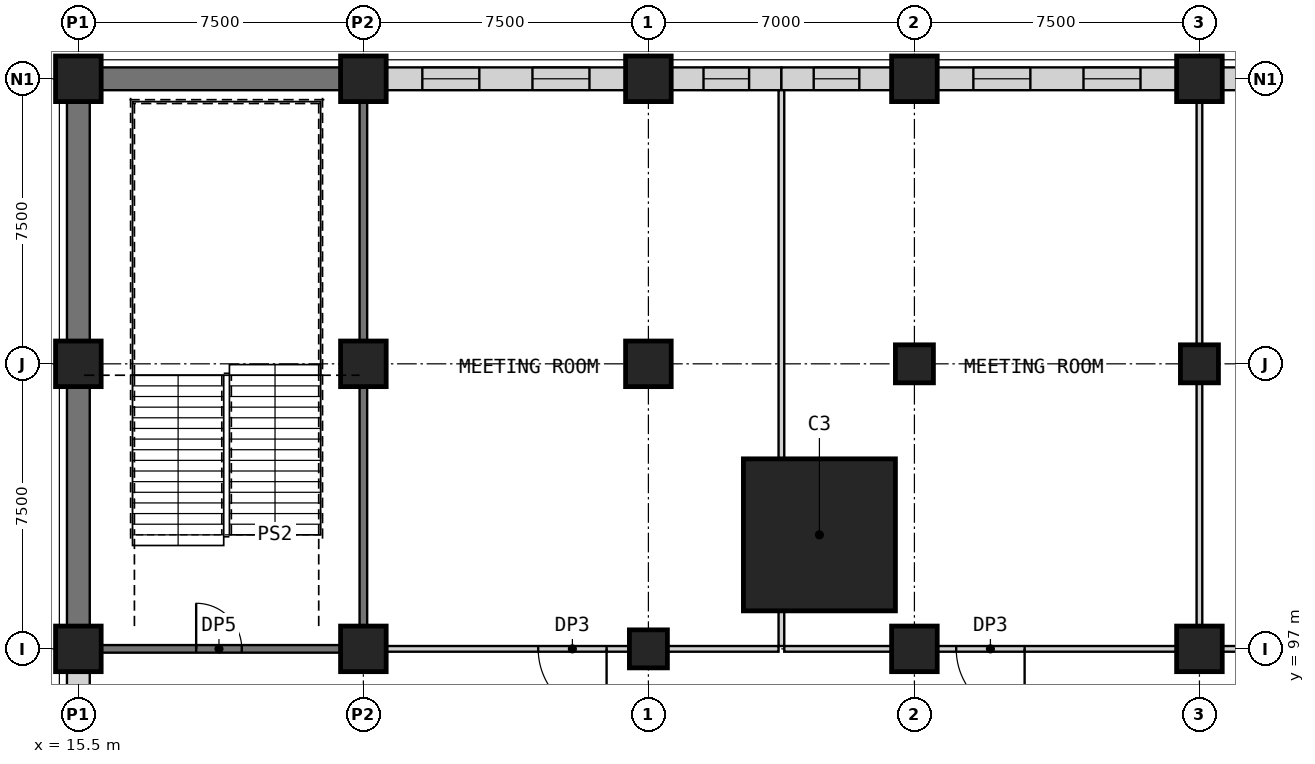
"""IFC4 building model, lengths in metres.
Left out: names, types, materials, properties, quantities, classifications, styles, units other than length and angle.
Written with IfcOpenShell. Run it as: python <this file> out.ifc"""

import sys

from ifc_helpers import new_model, si_unit, direction, frame, frame_2d, origin, origin_2d, place, context, subcontext, project, spatial, rectangle, extrude, element, fill, save


model = new_model("IFC4")
c1 = context("Model", 3, precision=1e-05, world=origin(), true_north=direction((0.0, 1.0)))
c2 = subcontext(c1, "Body", "Model", "MODEL_VIEW")
j1 = project(units=[si_unit("LENGTHUNIT", "METRE"), si_unit("PLANEANGLEUNIT", "RADIAN")], contexts=[c1])
p1 = place(None, origin())
s1 = spatial("IfcSite", under=j1, at=p1, CompositionType="ELEMENT")
p2 = place(p1, origin())
s2 = spatial("IfcBuilding", under=s1, at=p2, CompositionType="ELEMENT")
p3 = place(p2, frame((0.0, 0.0, 23.5)))
s3 = spatial("IfcBuildingStorey", under=s2, at=p3, CompositionType="ELEMENT", Elevation=23.5)
p4 = place(p3, frame((30.5, 97.0, 0.0), z_axis=(0.0, 0.0, 1.0), x_axis=(1.0, 0.0, 0.0)))
e1 = element("IfcColumn", 1, at=p4, inside=s3, PredefinedType="COLUMN", context=c2, shape_type="SweptSolid", body=[
    extrude(rectangle(XDim=1.0, YDim=1.0, at=origin_2d()), origin(), (0.0, 0.0, 1.0), 5.5),
])
p5 = place(p3, frame((37.5, 97.0, 0.0), z_axis=(0.0, 0.0, 1.0), x_axis=(1.0, 0.0, 0.0)))
e2 = element("IfcColumn", 2, at=p5, inside=s3, PredefinedType="COLUMN", context=c2, shape_type="SweptSolid", body=[
    extrude(rectangle(XDim=1.2, YDim=1.2, at=origin_2d()), origin(), (0.0, 0.0, 1.0), 5.5),
])
p6 = place(p3, frame((37.5, 104.5, 0.0), z_axis=(0.0, 0.0, 1.0), x_axis=(1.0, 0.0, 0.0)))
e3 = element("IfcColumn", 3, at=p6, inside=s3, PredefinedType="COLUMN", context=c2, shape_type="SweptSolid", body=[
    extrude(rectangle(XDim=1.0, YDim=1.0, at=origin_2d()), origin(), (0.0, 0.0, 1.0), 5.5),
])
p7 = place(p3, frame((45.0, 97.0, 0.0), z_axis=(0.0, 0.0, 1.0), x_axis=(1.0, 0.0, 0.0)))
e4 = element("IfcColumn", 4, at=p7, inside=s3, PredefinedType="COLUMN", context=c2, shape_type="SweptSolid", body=[
    extrude(rectangle(XDim=1.2, YDim=1.2, at=origin_2d()), origin(), (0.0, 0.0, 1.0), 5.5),
])
p8 = place(p3, frame((45.0, 104.5, 0.0), z_axis=(0.0, 0.0, 1.0), x_axis=(1.0, 0.0, 0.0)))
e5 = element("IfcColumn", 5, at=p8, inside=s3, PredefinedType="COLUMN", context=c2, shape_type="SweptSolid", body=[
    extrude(rectangle(XDim=1.0, YDim=1.0, at=origin_2d()), origin(), (0.0, 0.0, 1.0), 5.5),
])
p9 = place(p3, frame((35.0, 100.0, 0.0), z_axis=(0.0, 0.0, 1.0), x_axis=(1.0, 0.0, 0.0)))
e6 = element("IfcColumn", 6, at=p9, inside=s3, PredefinedType="COLUMN", context=c2, shape_type="SweptSolid", body=[
    extrude(rectangle(XDim=4.0, YDim=4.0, at=origin_2d()), origin(), (0.0, 0.0, 1.0), 5.5),
])
for number, where, z_axis, x_axis in (
    (7, (15.5, 97.0, 0.0), (0.0, 0.0, 1.0), (1.0, 0.0, 0.0)),
    (8, (15.5, 104.5, 0.0), (0.0, 0.0, 1.0), (1.0, 0.0, 0.0)),
    (9, (15.5, 112.0, 0.0), (0.0, 0.0, 1.0), (1.0, 0.0, 0.0)),
    (10, (23.0, 97.0, 0.0), (0.0, 0.0, 1.0), (1.0, 0.0, 0.0)),
    (11, (23.0, 104.5, 0.0), (0.0, 0.0, 1.0), (1.0, 0.0, 0.0)),
    (12, (23.0, 112.0, 0.0), (0.0, 0.0, 1.0), (1.0, 0.0, 0.0)),
    (13, (30.5, 104.5, 0.0), (0.0, 0.0, 1.0), (1.0, 0.0, 0.0)),
    (14, (30.5, 112.0, 0.0), (0.0, 0.0, 1.0), (1.0, 0.0, 0.0)),
    (15, (37.5, 112.0, 0.0), (0.0, 0.0, 1.0), (1.0, 0.0, 0.0)),
    (16, (45.0, 112.0, 0.0), (0.0, 0.0, 1.0), (1.0, 0.0, 0.0)),
):
    element("IfcColumn", number, at=place(p3, frame(where, z_axis=z_axis, x_axis=x_axis)), inside=s3, PredefinedType="COLUMN", context=c2, shape_type="SweptSolid", body=[
        extrude(rectangle(XDim=1.2, YDim=1.2, at=origin_2d()), origin(), (0.0, 0.0, 1.0), 5.5),
    ])
p10 = place(p3, frame((16.1, 97.0, 0.0), z_axis=(0.0, 0.0, 1.0), x_axis=(1.0, 0.0, 0.0)))
e17 = element("IfcWall", 17, at=p10, inside=s3, PredefinedType="SHEAR", context=c2, shape_type="SweptSolid", body=[
    extrude(rectangle(XDim=6.3, YDim=0.2, at=frame_2d((3.15, 0.0))), origin(), (0.0, 0.0, 1.0), 5.2),
])
p11 = place(p10, frame((2.5, 0.0, 0.0)))
e18 = element("IfcOpeningElement", 18, at=p11, cuts=e17, PredefinedType="OPENING", context=c2, shape_type="SweptSolid", body=[
    extrude(rectangle(XDim=1.2, YDim=2.1, at=frame_2d((0.6, 1.05))), frame((0.0, 0.11, 0.0), z_axis=(0.0, -1.0, 0.0), x_axis=(1.0, 0.0, 0.0)), (0.0, 0.0, 1.0), 0.22),
])
p12 = place(p3, frame((30.0, 97.0, 0.0), z_axis=(0.0, 0.0, 1.0), x_axis=(-1.0, 0.0, 0.0)))
e19 = element("IfcWall", 19, at=p12, inside=s3, PredefinedType="PARTITIONING", context=c2, shape_type="SweptSolid", body=[
    extrude(rectangle(XDim=6.4, YDim=0.15, at=frame_2d((3.2, 0.0))), origin(), (0.0, 0.0, 1.0), 5.2),
])
p13 = place(p12, frame((0.6, 0.0, 0.0)))
e20 = element("IfcOpeningElement", 20, at=p13, cuts=e19, PredefinedType="OPENING", context=c2, shape_type="SweptSolid", body=[
    extrude(rectangle(XDim=1.8, YDim=2.4, at=frame_2d((0.9, 1.2))), frame((0.0, 0.085, 0.0), z_axis=(0.0, -1.0, 0.0), x_axis=(1.0, 0.0, 0.0)), (0.0, 0.0, 1.0), 0.17),
])
p14 = place(p3, frame((31.0, 97.0, 0.0), z_axis=(0.0, 0.0, 1.0), x_axis=(1.0, 0.0, 0.0)))
e21 = element("IfcWall", 21, at=p14, inside=s3, PredefinedType="PARTITIONING", context=c2, shape_type="SweptSolid", body=[
    extrude(rectangle(XDim=2.925, YDim=0.15, at=frame_2d((1.462, 0.0))), origin(), (0.0, 0.0, 1.0), 5.2),
])
p15 = place(p3, frame((34.075, 97.0, 0.0), z_axis=(0.0, 0.0, 1.0), x_axis=(1.0, 0.0, 0.0)))
e22 = element("IfcWall", 22, at=p15, inside=s3, PredefinedType="PARTITIONING", context=c2, shape_type="SweptSolid", body=[
    extrude(rectangle(XDim=2.825, YDim=0.15, at=frame_2d((1.413, 0.0))), origin(), (0.0, 0.0, 1.0), 5.2),
])
p16 = place(p3, frame((44.4, 97.0, 0.0), z_axis=(0.0, 0.0, 1.0), x_axis=(-1.0, 0.0, 0.0)))
e23 = element("IfcWall", 23, at=p16, inside=s3, PredefinedType="PARTITIONING", context=c2, shape_type="SweptSolid", body=[
    extrude(rectangle(XDim=6.3, YDim=0.15, at=frame_2d((3.15, 0.0))), origin(), (0.0, 0.0, 1.0), 5.2),
])
p17 = place(p16, frame((4.0, 0.0, 0.0)))
e24 = element("IfcOpeningElement", 24, at=p17, cuts=e23, PredefinedType="OPENING", context=c2, shape_type="SweptSolid", body=[
    extrude(rectangle(XDim=1.8, YDim=2.4, at=frame_2d((0.9, 1.2))), frame((0.0, 0.085, 0.0), z_axis=(0.0, -1.0, 0.0), x_axis=(1.0, 0.0, 0.0)), (0.0, 0.0, 1.0), 0.17),
])
p18 = place(p3, frame((51.9, 97.0, 0.0), z_axis=(0.0, 0.0, 1.0), x_axis=(-1.0, 0.0, 0.0)))
e25 = element("IfcWall", 25, at=p18, inside=s3, PredefinedType="PARTITIONING", context=c2, shape_type="SweptSolid", body=[
    extrude(rectangle(XDim=6.3, YDim=0.15, at=frame_2d((3.15, 0.0))), origin(), (0.0, 0.0, 1.0), 5.2),
])
p19 = place(p18, frame((0.5, 0.0, 0.0)))
e26 = element("IfcOpeningElement", 26, at=p19, cuts=e25, PredefinedType="OPENING", context=c2, shape_type="SweptSolid", body=[
    extrude(rectangle(XDim=1.8, YDim=2.4, at=frame_2d((0.9, 1.2))), frame((0.0, 0.085, 0.0), z_axis=(0.0, -1.0, 0.0), x_axis=(1.0, 0.0, 0.0)), (0.0, 0.0, 1.0), 0.17),
])
p20 = place(p3, frame((16.1, 112.0, 0.0), z_axis=(0.0, 0.0, 1.0), x_axis=(1.0, 0.0, 0.0)))
e27 = element("IfcWall", 27, at=p20, inside=s3, PredefinedType="PARTITIONING", context=c2, shape_type="SweptSolid", body=[
    extrude(rectangle(XDim=6.3, YDim=0.6, at=frame_2d((3.15, 0.0))), origin(), (0.0, 0.0, 1.0), 4.6),
])
p21 = place(p3, frame((23.6, 112.0, 0.0), z_axis=(0.0, 0.0, 1.0), x_axis=(1.0, 0.0, 0.0)))
e28 = element("IfcWall", 28, at=p21, inside=s3, PredefinedType="PARTITIONING", context=c2, shape_type="SweptSolid", body=[
    extrude(rectangle(XDim=6.3, YDim=0.6, at=frame_2d((3.15, 0.0))), origin(), (0.0, 0.0, 1.0), 4.6),
])
p22 = place(p21, frame((0.951, 0.0, 0.9)))
e29 = element("IfcOpeningElement", 29, at=p22, cuts=e28, PredefinedType="OPENING", context=c2, shape_type="SweptSolid", body=[
    extrude(rectangle(XDim=1.5, YDim=2.8, at=frame_2d((0.75, 1.4))), frame((0.0, 0.31, 0.0), z_axis=(0.0, -1.0, 0.0), x_axis=(1.0, 0.0, 0.0)), (0.0, 0.0, 1.0), 0.62),
])
p23 = place(p21, frame((3.849, 0.0, 0.9)))
e30 = element("IfcOpeningElement", 30, at=p23, cuts=e28, PredefinedType="OPENING", context=c2, shape_type="SweptSolid", body=[
    extrude(rectangle(XDim=1.5, YDim=2.8, at=frame_2d((0.75, 1.4))), frame((0.0, 0.31, 0.0), z_axis=(0.0, -1.0, 0.0), x_axis=(1.0, 0.0, 0.0)), (0.0, 0.0, 1.0), 0.62),
])
p24 = place(p3, frame((31.1, 112.0, 0.0), z_axis=(0.0, 0.0, 1.0), x_axis=(1.0, 0.0, 0.0)))
e31 = element("IfcWall", 31, at=p24, inside=s3, PredefinedType="PARTITIONING", context=c2, shape_type="SweptSolid", body=[
    extrude(rectangle(XDim=2.9, YDim=0.6, at=frame_2d((1.45, 0.0))), origin(), (0.0, 0.0, 1.0), 4.6),
])
p25 = place(p24, frame((0.85, 0.0, 0.9)))
e32 = element("IfcOpeningElement", 32, at=p25, cuts=e31, PredefinedType="OPENING", context=c2, shape_type="SweptSolid", body=[
    extrude(rectangle(XDim=1.2, YDim=2.8, at=frame_2d((0.6, 1.4))), frame((0.0, 0.31, 0.0), z_axis=(0.0, -1.0, 0.0), x_axis=(1.0, 0.0, 0.0)), (0.0, 0.0, 1.0), 0.62),
])
p26 = place(p3, frame((34.0, 112.0, 0.0), z_axis=(0.0, 0.0, 1.0), x_axis=(1.0, 0.0, 0.0)))
e33 = element("IfcWall", 33, at=p26, inside=s3, PredefinedType="PARTITIONING", context=c2, shape_type="SweptSolid", body=[
    extrude(rectangle(XDim=2.9, YDim=0.6, at=frame_2d((1.45, 0.0))), origin(), (0.0, 0.0, 1.0), 4.6),
])
p27 = place(p26, frame((0.85, 0.0, 0.9)))
e34 = element("IfcOpeningElement", 34, at=p27, cuts=e33, PredefinedType="OPENING", context=c2, shape_type="SweptSolid", body=[
    extrude(rectangle(XDim=1.2, YDim=2.8, at=frame_2d((0.6, 1.4))), frame((0.0, 0.31, 0.0), z_axis=(0.0, -1.0, 0.0), x_axis=(1.0, 0.0, 0.0)), (0.0, 0.0, 1.0), 0.62),
])
p28 = place(p3, frame((38.1, 112.0, 0.0), z_axis=(0.0, 0.0, 1.0), x_axis=(1.0, 0.0, 0.0)))
e35 = element("IfcWall", 35, at=p28, inside=s3, PredefinedType="PARTITIONING", context=c2, shape_type="SweptSolid", body=[
    extrude(rectangle(XDim=6.3, YDim=0.6, at=frame_2d((3.15, 0.0))), origin(), (0.0, 0.0, 1.0), 4.6),
])
p29 = place(p28, frame((0.951, 0.0, 0.9)))
e36 = element("IfcOpeningElement", 36, at=p29, cuts=e35, PredefinedType="OPENING", context=c2, shape_type="SweptSolid", body=[
    extrude(rectangle(XDim=1.5, YDim=2.8, at=frame_2d((0.75, 1.4))), frame((0.0, 0.31, 0.0), z_axis=(0.0, -1.0, 0.0), x_axis=(1.0, 0.0, 0.0)), (0.0, 0.0, 1.0), 0.62),
])
p30 = place(p28, frame((3.849, 0.0, 0.9)))
e37 = element("IfcOpeningElement", 37, at=p30, cuts=e35, PredefinedType="OPENING", context=c2, shape_type="SweptSolid", body=[
    extrude(rectangle(XDim=1.5, YDim=2.8, at=frame_2d((0.75, 1.4))), frame((0.0, 0.31, 0.0), z_axis=(0.0, -1.0, 0.0), x_axis=(1.0, 0.0, 0.0)), (0.0, 0.0, 1.0), 0.62),
])
p31 = place(p3, frame((45.6, 112.0, 0.0), z_axis=(0.0, 0.0, 1.0), x_axis=(1.0, 0.0, 0.0)))
e38 = element("IfcWall", 38, at=p31, inside=s3, PredefinedType="PARTITIONING", context=c2, shape_type="SweptSolid", body=[
    extrude(rectangle(XDim=6.3, YDim=0.6, at=frame_2d((3.15, 0.0))), origin(), (0.0, 0.0, 1.0), 4.6),
])
p32 = place(p31, frame((0.951, 0.0, 0.9)))
e39 = element("IfcOpeningElement", 39, at=p32, cuts=e38, PredefinedType="OPENING", context=c2, shape_type="SweptSolid", body=[
    extrude(rectangle(XDim=1.5, YDim=2.8, at=frame_2d((0.75, 1.4))), frame((0.0, 0.31, 0.0), z_axis=(0.0, -1.0, 0.0), x_axis=(1.0, 0.0, 0.0)), (0.0, 0.0, 1.0), 0.62),
])
p33 = place(p31, frame((3.849, 0.0, 0.9)))
e40 = element("IfcOpeningElement", 40, at=p33, cuts=e38, PredefinedType="OPENING", context=c2, shape_type="SweptSolid", body=[
    extrude(rectangle(XDim=1.5, YDim=2.8, at=frame_2d((0.75, 1.4))), frame((0.0, 0.31, 0.0), z_axis=(0.0, -1.0, 0.0), x_axis=(1.0, 0.0, 0.0)), (0.0, 0.0, 1.0), 0.62),
])
p34 = place(p3, frame((15.5, 90.6, 0.0), z_axis=(0.0, 0.0, 1.0), x_axis=(0.0, 1.0, 0.0)))
e41 = element("IfcWall", 41, at=p34, inside=s3, PredefinedType="PARTITIONING", context=c2, shape_type="SweptSolid", body=[
    extrude(rectangle(XDim=5.8, YDim=0.6, at=frame_2d((2.9, 0.0))), origin(), (0.0, 0.0, 1.0), 4.6),
])
p35 = place(p34, frame((0.816, 0.0, 0.9)))
e42 = element("IfcOpeningElement", 42, at=p35, cuts=e41, PredefinedType="OPENING", context=c2, shape_type="SweptSolid", body=[
    extrude(rectangle(XDim=1.5, YDim=2.8, at=frame_2d((0.75, 1.4))), frame((0.0, 0.31, 0.0), z_axis=(0.0, -1.0, 0.0), x_axis=(1.0, 0.0, 0.0)), (0.0, 0.0, 1.0), 0.62),
])
p36 = place(p34, frame((3.484, 0.0, 0.9)))
e43 = element("IfcOpeningElement", 43, at=p36, cuts=e41, PredefinedType="OPENING", context=c2, shape_type="SweptSolid", body=[
    extrude(rectangle(XDim=1.5, YDim=2.8, at=frame_2d((0.75, 1.4))), frame((0.0, 0.31, 0.0), z_axis=(0.0, -1.0, 0.0), x_axis=(1.0, 0.0, 0.0)), (0.0, 0.0, 1.0), 0.62),
])
for number, where, z_axis, x_axis in (
    (44, (15.5, 97.6, 0.0), (0.0, 0.0, 1.0), (0.0, 1.0, 0.0)),
    (45, (15.5, 105.1, 0.0), (0.0, 0.0, 1.0), (0.0, 1.0, 0.0)),
):
    element("IfcWall", number, at=place(p3, frame(where, z_axis=z_axis, x_axis=x_axis)), inside=s3, PredefinedType="PARTITIONING", context=c2, shape_type="SweptSolid", body=[
        extrude(rectangle(XDim=6.3, YDim=0.6, at=frame_2d((3.15, 0.0))), origin(), (0.0, 0.0, 1.0), 4.6),
    ])
for number, where, z_axis, x_axis in (
    (46, (23.0, 97.6, 0.0), (0.0, 0.0, 1.0), (0.0, 1.0, 0.0)),
    (47, (23.0, 105.1, 0.0), (0.0, 0.0, 1.0), (0.0, 1.0, 0.0)),
):
    element("IfcWall", number, at=place(p3, frame(where, z_axis=z_axis, x_axis=x_axis)), inside=s3, PredefinedType="SHEAR", context=c2, shape_type="SweptSolid", body=[
        extrude(rectangle(XDim=6.3, YDim=0.2, at=frame_2d((3.15, 0.0))), origin(), (0.0, 0.0, 1.0), 5.2),
    ])
p37 = place(p3, frame((34.0, 97.075, 0.0), z_axis=(0.0, 0.0, 1.0), x_axis=(0.0, 1.0, 0.0)))
e48 = element("IfcWall", 48, at=p37, inside=s3, PredefinedType="PARTITIONING", context=c2, shape_type="SweptSolid", body=[
    extrude(rectangle(XDim=0.925, YDim=0.15, at=frame_2d((0.462, 0.0))), origin(), (0.0, 0.0, 1.0), 5.2),
])
p38 = place(p3, frame((34.0, 102.0, 0.0), z_axis=(0.0, 0.0, 1.0), x_axis=(0.0, 1.0, 0.0)))
e49 = element("IfcWall", 49, at=p38, inside=s3, PredefinedType="PARTITIONING", context=c2, shape_type="SweptSolid", body=[
    extrude(rectangle(XDim=9.7, YDim=0.15, at=frame_2d((4.85, 0.0))), origin(), (0.0, 0.0, 1.0), 5.2),
])
for number, where, z_axis, x_axis in (
    (50, (45.0, 97.6, 0.0), (0.0, 0.0, 1.0), (0.0, 1.0, 0.0)),
    (51, (45.0, 105.0, 0.0), (0.0, 0.0, 1.0), (0.0, 1.0, 0.0)),
):
    element("IfcWall", number, at=place(p3, frame(where, z_axis=z_axis, x_axis=x_axis)), inside=s3, PredefinedType="PARTITIONING", context=c2, shape_type="SweptSolid", body=[
        extrude(rectangle(XDim=6.4, YDim=0.15, at=frame_2d((3.2, 0.0))), origin(), (0.0, 0.0, 1.0), 5.2),
    ])
p39 = place(p11, origin())
e52 = element("IfcDoor", 52, at=p39, inside=s3, OperationType="SINGLE_SWING_LEFT", PredefinedType="DOOR", context=c2, shape_type="SweptSolid", body=[
    extrude(rectangle(XDim=1.2, YDim=2.1, at=frame_2d((0.6, 1.05))), frame((0.0, 0.025, 0.0), z_axis=(0.0, -1.0, 0.0), x_axis=(1.0, 0.0, 0.0)), (0.0, 0.0, 1.0), 0.05),
])
fill(e18, e52)
p40 = place(p13, origin())
e53 = element("IfcDoor", 53, at=p40, inside=s3, OperationType="SINGLE_SWING_LEFT", PredefinedType="DOOR", context=c2, shape_type="SweptSolid", body=[
    extrude(rectangle(XDim=1.8, YDim=2.4, at=frame_2d((0.9, 1.2))), frame((0.0, 0.025, 0.0), z_axis=(0.0, -1.0, 0.0), x_axis=(1.0, 0.0, 0.0)), (0.0, 0.0, 1.0), 0.05),
])
fill(e20, e53)
p41 = place(p17, origin())
e54 = element("IfcDoor", 54, at=p41, inside=s3, OperationType="SINGLE_SWING_LEFT", PredefinedType="DOOR", context=c2, shape_type="SweptSolid", body=[
    extrude(rectangle(XDim=1.8, YDim=2.4, at=frame_2d((0.9, 1.2))), frame((0.0, 0.025, 0.0), z_axis=(0.0, -1.0, 0.0), x_axis=(1.0, 0.0, 0.0)), (0.0, 0.0, 1.0), 0.05),
])
fill(e24, e54)
p42 = place(p22, origin())
e55 = element("IfcWindow", 55, at=p42, inside=s3, PartitioningType="SINGLE_PANEL", PredefinedType="WINDOW", context=c2, shape_type="SweptSolid", body=[
    extrude(rectangle(XDim=1.5, YDim=2.8, at=frame_2d((0.75, 1.4))), frame((0.0, 0.03, 0.0), z_axis=(0.0, -1.0, 0.0), x_axis=(1.0, 0.0, 0.0)), (0.0, 0.0, 1.0), 0.06),
])
fill(e29, e55)
p43 = place(p23, origin())
e56 = element("IfcWindow", 56, at=p43, inside=s3, PartitioningType="SINGLE_PANEL", PredefinedType="WINDOW", context=c2, shape_type="SweptSolid", body=[
    extrude(rectangle(XDim=1.5, YDim=2.8, at=frame_2d((0.75, 1.4))), frame((0.0, 0.03, 0.0), z_axis=(0.0, -1.0, 0.0), x_axis=(1.0, 0.0, 0.0)), (0.0, 0.0, 1.0), 0.06),
])
fill(e30, e56)
p44 = place(p25, origin())
e57 = element("IfcWindow", 57, at=p44, inside=s3, PartitioningType="SINGLE_PANEL", PredefinedType="WINDOW", context=c2, shape_type="SweptSolid", body=[
    extrude(rectangle(XDim=1.2, YDim=2.8, at=frame_2d((0.6, 1.4))), frame((0.0, 0.03, 0.0), z_axis=(0.0, -1.0, 0.0), x_axis=(1.0, 0.0, 0.0)), (0.0, 0.0, 1.0), 0.06),
])
fill(e32, e57)
p45 = place(p27, origin())
e58 = element("IfcWindow", 58, at=p45, inside=s3, PartitioningType="SINGLE_PANEL", PredefinedType="WINDOW", context=c2, shape_type="SweptSolid", body=[
    extrude(rectangle(XDim=1.2, YDim=2.8, at=frame_2d((0.6, 1.4))), frame((0.0, 0.03, 0.0), z_axis=(0.0, -1.0, 0.0), x_axis=(1.0, 0.0, 0.0)), (0.0, 0.0, 1.0), 0.06),
])
fill(e34, e58)
p46 = place(p29, origin())
e59 = element("IfcWindow", 59, at=p46, inside=s3, PartitioningType="SINGLE_PANEL", PredefinedType="WINDOW", context=c2, shape_type="SweptSolid", body=[
    extrude(rectangle(XDim=1.5, YDim=2.8, at=frame_2d((0.75, 1.4))), frame((0.0, 0.03, 0.0), z_axis=(0.0, -1.0, 0.0), x_axis=(1.0, 0.0, 0.0)), (0.0, 0.0, 1.0), 0.06),
])
fill(e36, e59)
p47 = place(p30, origin())
e60 = element("IfcWindow", 60, at=p47, inside=s3, PartitioningType="SINGLE_PANEL", PredefinedType="WINDOW", context=c2, shape_type="SweptSolid", body=[
    extrude(rectangle(XDim=1.5, YDim=2.8, at=frame_2d((0.75, 1.4))), frame((0.0, 0.03, 0.0), z_axis=(0.0, -1.0, 0.0), x_axis=(1.0, 0.0, 0.0)), (0.0, 0.0, 1.0), 0.06),
])
fill(e37, e60)
save(model, sys.argv[1])
